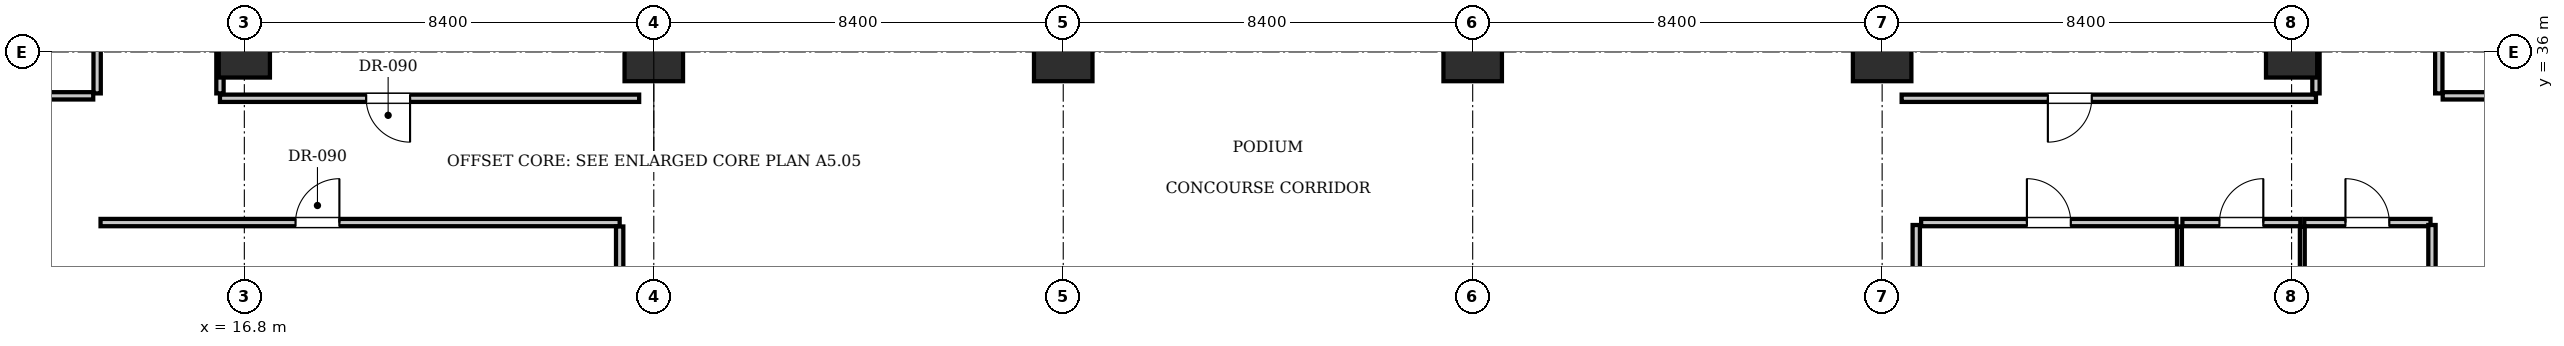
"""IFC4 building model, lengths in metres.
Left out: names, types, materials, properties, quantities, classifications, styles, units other than length and angle.
Written with IfcOpenShell. Run it as: python <this file> out.ifc"""

import sys

from ifc_helpers import new_model, si_unit, direction, frame, frame_2d, origin, origin_2d, place, context, subcontext, project, spatial, rectangle, extrude, element, fill, save


model = new_model("IFC4")
c1 = context("Model", 3, precision=1e-05, world=origin(), true_north=direction((0.0, 1.0)))
c2 = subcontext(c1, "Body", "Model", "MODEL_VIEW")
j1 = project(units=[si_unit("LENGTHUNIT", "METRE"), si_unit("PLANEANGLEUNIT", "RADIAN")], contexts=[c1])
p1 = place(None, origin())
s1 = spatial("IfcSite", under=j1, at=p1, CompositionType="ELEMENT")
p2 = place(p1, origin())
s2 = spatial("IfcBuilding", under=s1, at=p2, CompositionType="ELEMENT")
p3 = place(p2, frame((0.0, 0.0, 10.85)))
s3 = spatial("IfcBuildingStorey", under=s2, at=p3, CompositionType="ELEMENT", Elevation=10.85)
for number, where, z_axis, x_axis in (
    (1, (25.2, 36.0, 0.0), (0.0, 0.0, 1.0), (1.0, 0.0, 0.0)),
    (2, (33.6, 36.0, 0.0), (0.0, 0.0, 1.0), (1.0, 0.0, 0.0)),
    (3, (42.0, 36.0, 0.0), (0.0, 0.0, 1.0), (1.0, 0.0, 0.0)),
    (4, (50.4, 36.0, 0.0), (0.0, 0.0, 1.0), (1.0, 0.0, 0.0)),
):
    element("IfcColumn", number, at=place(p3, frame(where, z_axis=z_axis, x_axis=x_axis)), inside=s3, PredefinedType="COLUMN", context=c2, shape_type="SweptSolid", body=[
        extrude(rectangle(XDim=1.2, YDim=1.2, at=origin_2d()), origin(), (0.0, 0.0, 1.0), 5.6),
    ])
for number, where, z_axis, x_axis in (
    (5, (16.8, 36.0, 0.0), (0.0, 0.0, 1.0), (1.0, 0.0, 0.0)),
    (6, (58.8, 36.0, 0.0), (0.0, 0.0, 1.0), (1.0, 0.0, 0.0)),
):
    element("IfcColumn", number, at=place(p3, frame(where, z_axis=z_axis, x_axis=x_axis)), inside=s3, PredefinedType="COLUMN", context=c2, shape_type="SweptSolid", body=[
        extrude(rectangle(XDim=1.05, YDim=1.05, at=origin_2d()), origin(), (0.0, 0.0, 1.0), 5.6),
    ])
p4 = place(p3, frame((13.85, 32.5, 0.0), z_axis=(0.0, 0.0, 1.0), x_axis=(1.0, 0.0, 0.0)))
e7 = element("IfcWall", 7, at=p4, inside=s3, PredefinedType="PARTITIONING", context=c2, shape_type="SweptSolid", body=[
    extrude(rectangle(XDim=10.65, YDim=0.15, at=frame_2d((5.325, 0.0))), origin(), (0.0, 0.0, 1.0), 5.32),
])
p5 = place(p4, frame((4.0, 0.0, 0.0)))
e8 = element("IfcOpeningElement", 8, at=p5, cuts=e7, PredefinedType="OPENING", context=c2, shape_type="SweptSolid", body=[
    extrude(rectangle(XDim=0.9, YDim=2.1, at=frame_2d((0.45, 1.05))), frame((0.0, 0.085, 0.0), z_axis=(0.0, -1.0, 0.0), x_axis=(1.0, 0.0, 0.0)), (0.0, 0.0, 1.0), 0.17),
])
p6 = place(p3, frame((24.5, 21.6, 0.0), z_axis=(0.0, 0.0, 1.0), x_axis=(0.0, 1.0, 0.0)))
e9 = element("IfcWall", 9, at=p6, inside=s3, PredefinedType="PARTITIONING", context=c2, shape_type="SweptSolid", body=[
    extrude(rectangle(XDim=10.82, YDim=0.15, at=frame_2d((5.41, 0.0))), origin(), (0.0, 0.0, 1.0), 5.32),
])
p7 = place(p3, frame((16.3, 35.05, 0.0), z_axis=(0.0, 0.0, 1.0), x_axis=(1.0, 0.0, 0.0)))
e10 = element("IfcWall", 10, at=p7, inside=s3, PredefinedType="PARTITIONING", context=c2, shape_type="SweptSolid", body=[
    extrude(rectangle(XDim=8.6, YDim=0.15, at=frame_2d((4.3, 0.0))), origin(), (0.0, 0.0, 1.0), 5.32),
])
p8 = place(p7, frame((3.0, 0.0, 0.0)))
e11 = element("IfcOpeningElement", 11, at=p8, cuts=e10, PredefinedType="OPENING", context=c2, shape_type="SweptSolid", body=[
    extrude(rectangle(XDim=0.9, YDim=2.1, at=frame_2d((0.45, 1.05))), frame((0.0, 0.085, 0.0), z_axis=(0.0, -1.0, 0.0), x_axis=(1.0, 0.0, 0.0)), (0.0, 0.0, 1.0), 0.17),
])
p9 = place(p3, frame((16.3, 35.15, 0.0), z_axis=(0.0, 0.0, 1.0), x_axis=(0.0, 1.0, 0.0)))
e12 = element("IfcWall", 12, at=p9, inside=s3, PredefinedType="PARTITIONING", context=c2, shape_type="SweptSolid", body=[
    extrude(rectangle(XDim=18.6, YDim=0.15, at=frame_2d((9.3, 0.0))), origin(), (0.0, 0.0, 1.0), 5.32),
])
p10 = place(p3, frame((13.78, 35.15, 0.0), z_axis=(0.0, 0.0, 1.0), x_axis=(0.0, 1.0, 0.0)))
e13 = element("IfcWall", 13, at=p10, inside=s3, PredefinedType="PARTITIONING", context=c2, shape_type="SweptSolid", body=[
    extrude(rectangle(XDim=9.7, YDim=0.15, at=frame_2d((4.85, 0.0))), origin(), (0.0, 0.0, 1.0), 5.32),
])
p11 = place(p10, frame((3.0, 0.0, 0.0)))
e14 = element("IfcOpeningElement", 14, at=p11, cuts=e13, PredefinedType="OPENING", context=c2, shape_type="SweptSolid", body=[
    extrude(rectangle(XDim=0.9, YDim=2.1, at=frame_2d((0.45, 1.05))), frame((0.0, 0.085, 0.0), z_axis=(0.0, -1.0, 0.0), x_axis=(1.0, 0.0, 0.0)), (0.0, 0.0, 1.0), 0.17),
])
p12 = place(p3, frame((4.35, 35.1, 0.0), z_axis=(0.0, 0.0, 1.0), x_axis=(1.0, 0.0, 0.0)))
e15 = element("IfcWall", 15, at=p12, inside=s3, PredefinedType="PARTITIONING", context=c2, shape_type="SweptSolid", body=[
    extrude(rectangle(XDim=9.35, YDim=0.15, at=frame_2d((4.675, 0.0))), origin(), (0.0, 0.0, 1.0), 5.32),
])
p13 = place(p3, frame((51.2, 32.5, 0.0), z_axis=(0.0, 0.0, 1.0), x_axis=(1.0, 0.0, 0.0)))
e16 = element("IfcWall", 16, at=p13, inside=s3, PredefinedType="PARTITIONING", context=c2, shape_type="SweptSolid", body=[
    extrude(rectangle(XDim=5.24, YDim=0.15, at=frame_2d((2.62, 0.0))), origin(), (0.0, 0.0, 1.0), 5.32),
])
p14 = place(p13, frame((2.17, 0.0, 0.0)))
e17 = element("IfcOpeningElement", 17, at=p14, cuts=e16, PredefinedType="OPENING", context=c2, shape_type="SweptSolid", body=[
    extrude(rectangle(XDim=0.9, YDim=2.1, at=frame_2d((0.45, 1.05))), frame((0.0, 0.085, 0.0), z_axis=(0.0, -1.0, 0.0), x_axis=(1.0, 0.0, 0.0)), (0.0, 0.0, 1.0), 0.17),
])
p15 = place(p3, frame((56.56, 32.5, 0.0), z_axis=(0.0, 0.0, 1.0), x_axis=(1.0, 0.0, 0.0)))
e18 = element("IfcWall", 18, at=p15, inside=s3, PredefinedType="PARTITIONING", context=c2, shape_type="SweptSolid", body=[
    extrude(rectangle(XDim=2.42, YDim=0.15, at=frame_2d((1.21, 0.0))), origin(), (0.0, 0.0, 1.0), 5.32),
])
p16 = place(p15, frame((0.76, 0.0, 0.0)))
e19 = element("IfcOpeningElement", 19, at=p16, cuts=e18, PredefinedType="OPENING", context=c2, shape_type="SweptSolid", body=[
    extrude(rectangle(XDim=0.9, YDim=2.1, at=frame_2d((0.45, 1.05))), frame((0.0, 0.085, 0.0), z_axis=(0.0, -1.0, 0.0), x_axis=(1.0, 0.0, 0.0)), (0.0, 0.0, 1.0), 0.17),
])
p17 = place(p3, frame((59.06, 32.5, 0.0), z_axis=(0.0, 0.0, 1.0), x_axis=(1.0, 0.0, 0.0)))
e20 = element("IfcWall", 20, at=p17, inside=s3, PredefinedType="PARTITIONING", context=c2, shape_type="SweptSolid", body=[
    extrude(rectangle(XDim=2.59, YDim=0.15, at=frame_2d((1.295, 0.0))), origin(), (0.0, 0.0, 1.0), 5.32),
])
p18 = place(p17, frame((0.845, 0.0, 0.0)))
e21 = element("IfcOpeningElement", 21, at=p18, cuts=e20, PredefinedType="OPENING", context=c2, shape_type="SweptSolid", body=[
    extrude(rectangle(XDim=0.9, YDim=2.1, at=frame_2d((0.45, 1.05))), frame((0.0, 0.085, 0.0), z_axis=(0.0, -1.0, 0.0), x_axis=(1.0, 0.0, 0.0)), (0.0, 0.0, 1.0), 0.17),
])
for number, where, z_axis, x_axis in (
    (22, (51.1, 26.18, 0.0), (0.0, 0.0, 1.0), (0.0, 1.0, 0.0)),
    (23, (61.68, 26.18, 0.0), (0.0, 0.0, 1.0), (0.0, 1.0, 0.0)),
):
    element("IfcWall", number, at=place(p3, frame(where, z_axis=z_axis, x_axis=x_axis)), inside=s3, PredefinedType="PARTITIONING", context=c2, shape_type="SweptSolid", body=[
        extrude(rectangle(XDim=6.27, YDim=0.15, at=frame_2d((3.135, 0.0))), origin(), (0.0, 0.0, 1.0), 5.32),
    ])
for number, where, z_axis, x_axis in (
    (24, (56.5, 26.18, 0.0), (0.0, 0.0, 1.0), (0.0, 1.0, 0.0)),
    (25, (59.02, 26.18, 0.0), (0.0, 0.0, 1.0), (0.0, 1.0, 0.0)),
):
    element("IfcWall", number, at=place(p3, frame(where, z_axis=z_axis, x_axis=x_axis)), inside=s3, PredefinedType="PARTITIONING", context=c2, shape_type="SweptSolid", body=[
        extrude(rectangle(XDim=6.24, YDim=0.1, at=frame_2d((3.12, 0.0))), origin(), (0.0, 0.0, 1.0), 5.32),
    ])
p19 = place(p3, frame((50.8, 35.05, 0.0), z_axis=(0.0, 0.0, 1.0), x_axis=(1.0, 0.0, 0.0)))
e26 = element("IfcWall", 26, at=p19, inside=s3, PredefinedType="PARTITIONING", context=c2, shape_type="SweptSolid", body=[
    extrude(rectangle(XDim=8.5, YDim=0.15, at=frame_2d((4.25, 0.0))), origin(), (0.0, 0.0, 1.0), 5.32),
])
p20 = place(p19, frame((3.0, 0.0, 0.0)))
e27 = element("IfcOpeningElement", 27, at=p20, cuts=e26, PredefinedType="OPENING", context=c2, shape_type="SweptSolid", body=[
    extrude(rectangle(XDim=0.9, YDim=2.1, at=frame_2d((0.45, 1.05))), frame((0.0, 0.085, 0.0), z_axis=(0.0, -1.0, 0.0), x_axis=(1.0, 0.0, 0.0)), (0.0, 0.0, 1.0), 0.17),
])
p21 = place(p3, frame((59.3, 35.15, 0.0), z_axis=(0.0, 0.0, 1.0), x_axis=(0.0, 1.0, 0.0)))
e28 = element("IfcWall", 28, at=p21, inside=s3, PredefinedType="PARTITIONING", context=c2, shape_type="SweptSolid", body=[
    extrude(rectangle(XDim=18.6, YDim=0.15, at=frame_2d((9.3, 0.0))), origin(), (0.0, 0.0, 1.0), 5.32),
])
p22 = place(p3, frame((61.82, 35.15, 0.0), z_axis=(0.0, 0.0, 1.0), x_axis=(0.0, 1.0, 0.0)))
e29 = element("IfcWall", 29, at=p22, inside=s3, PredefinedType="PARTITIONING", context=c2, shape_type="SweptSolid", body=[
    extrude(rectangle(XDim=9.7, YDim=0.15, at=frame_2d((4.85, 0.0))), origin(), (0.0, 0.0, 1.0), 5.32),
])
p23 = place(p22, frame((3.0, 0.0, 0.0)))
e30 = element("IfcOpeningElement", 30, at=p23, cuts=e29, PredefinedType="OPENING", context=c2, shape_type="SweptSolid", body=[
    extrude(rectangle(XDim=0.9, YDim=2.1, at=frame_2d((0.45, 1.05))), frame((0.0, 0.085, 0.0), z_axis=(0.0, -1.0, 0.0), x_axis=(1.0, 0.0, 0.0)), (0.0, 0.0, 1.0), 0.17),
])
p24 = place(p3, frame((61.9, 35.1, 0.0), z_axis=(0.0, 0.0, 1.0), x_axis=(1.0, 0.0, 0.0)))
e31 = element("IfcWall", 31, at=p24, inside=s3, PredefinedType="PARTITIONING", context=c2, shape_type="SweptSolid", body=[
    extrude(rectangle(XDim=9.35, YDim=0.15, at=frame_2d((4.675, 0.0))), origin(), (0.0, 0.0, 1.0), 5.32),
])
p25 = place(p5, origin())
e32 = element("IfcDoor", 32, at=p25, inside=s3, OperationType="SINGLE_SWING_RIGHT", PredefinedType="DOOR", context=c2, shape_type="SweptSolid", body=[
    extrude(rectangle(XDim=0.9, YDim=2.1, at=frame_2d((0.45, 1.05))), frame((0.0, 0.025, 0.0), z_axis=(0.0, -1.0, 0.0), x_axis=(1.0, 0.0, 0.0)), (0.0, 0.0, 1.0), 0.05),
])
fill(e8, e32)
p26 = place(p8, frame((0.9, 0.0, 0.0), z_axis=(0.0, 0.0, 1.0), x_axis=(-1.0, 0.0, 0.0)))
e33 = element("IfcDoor", 33, at=p26, inside=s3, OperationType="SINGLE_SWING_LEFT", PredefinedType="DOOR", context=c2, shape_type="SweptSolid", body=[
    extrude(rectangle(XDim=0.9, YDim=2.1, at=frame_2d((0.45, 1.05))), frame((0.0, 0.025, 0.0), z_axis=(0.0, -1.0, 0.0), x_axis=(1.0, 0.0, 0.0)), (0.0, 0.0, 1.0), 0.05),
])
fill(e11, e33)
p27 = place(p14, origin())
e34 = element("IfcDoor", 34, at=p27, inside=s3, OperationType="SINGLE_SWING_LEFT", PredefinedType="DOOR", context=c2, shape_type="SweptSolid", body=[
    extrude(rectangle(XDim=0.9, YDim=2.1, at=frame_2d((0.45, 1.05))), frame((0.0, 0.025, 0.0), z_axis=(0.0, -1.0, 0.0), x_axis=(1.0, 0.0, 0.0)), (0.0, 0.0, 1.0), 0.05),
])
fill(e17, e34)
p28 = place(p16, origin())
e35 = element("IfcDoor", 35, at=p28, inside=s3, OperationType="SINGLE_SWING_RIGHT", PredefinedType="DOOR", context=c2, shape_type="SweptSolid", body=[
    extrude(rectangle(XDim=0.9, YDim=2.1, at=frame_2d((0.45, 1.05))), frame((0.0, 0.025, 0.0), z_axis=(0.0, -1.0, 0.0), x_axis=(1.0, 0.0, 0.0)), (0.0, 0.0, 1.0), 0.05),
])
fill(e19, e35)
p29 = place(p18, origin())
e36 = element("IfcDoor", 36, at=p29, inside=s3, OperationType="SINGLE_SWING_LEFT", PredefinedType="DOOR", context=c2, shape_type="SweptSolid", body=[
    extrude(rectangle(XDim=0.9, YDim=2.1, at=frame_2d((0.45, 1.05))), frame((0.0, 0.025, 0.0), z_axis=(0.0, -1.0, 0.0), x_axis=(1.0, 0.0, 0.0)), (0.0, 0.0, 1.0), 0.05),
])
fill(e21, e36)
p30 = place(p20, frame((0.9, 0.0, 0.0), z_axis=(0.0, 0.0, 1.0), x_axis=(-1.0, 0.0, 0.0)))
e37 = element("IfcDoor", 37, at=p30, inside=s3, OperationType="SINGLE_SWING_RIGHT", PredefinedType="DOOR", context=c2, shape_type="SweptSolid", body=[
    extrude(rectangle(XDim=0.9, YDim=2.1, at=frame_2d((0.45, 1.05))), frame((0.0, 0.025, 0.0), z_axis=(0.0, -1.0, 0.0), x_axis=(1.0, 0.0, 0.0)), (0.0, 0.0, 1.0), 0.05),
])
fill(e27, e37)
save(model, sys.argv[1])
